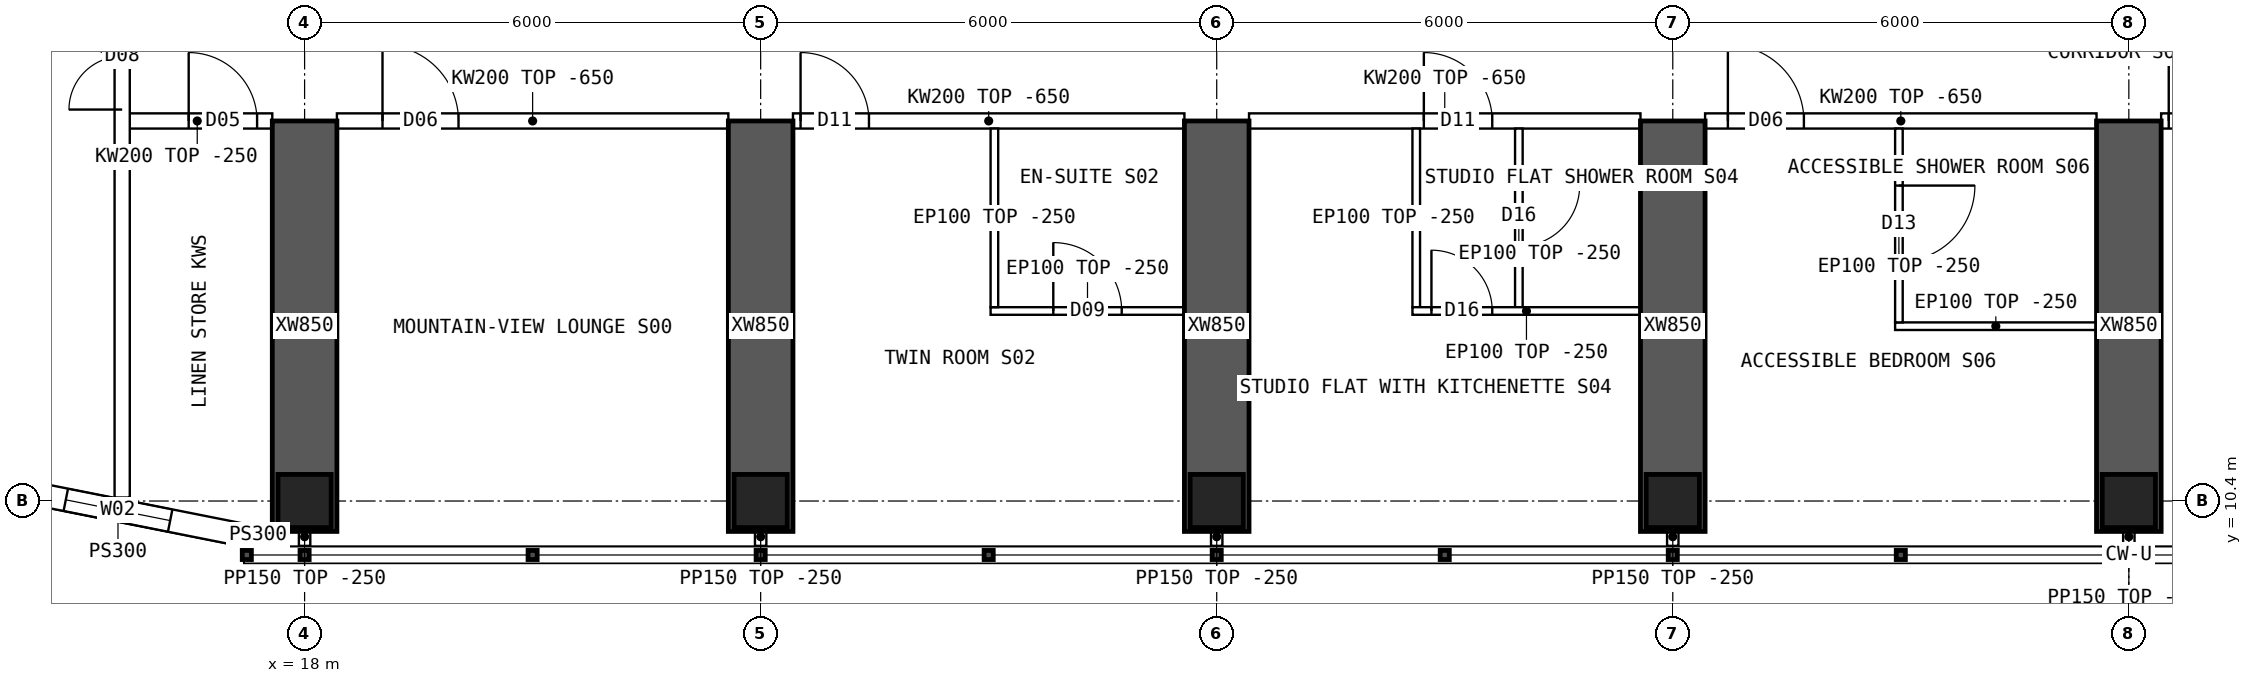
"""IFC4 building model, lengths in metres.
Left out: names, types, materials, properties, quantities, classifications, styles, units other than length and angle.
Written with IfcOpenShell. Run it as: python <this file> out.ifc"""

import sys

from ifc_helpers import new_model, si_unit, direction, frame, frame_2d, origin, origin_2d, place, context, subcontext, project, spatial, polyline, rectangle, hollow_rectangle, outline, extrude, element, fill, save


model = new_model("IFC4")
c1 = context("Model", 3, precision=1e-05, world=origin(), true_north=direction((0.0, 1.0)))
c2 = subcontext(c1, "Body", "Model", "MODEL_VIEW")
j1 = project(units=[si_unit("LENGTHUNIT", "METRE"), si_unit("PLANEANGLEUNIT", "RADIAN")], contexts=[c1])
p1 = place(None, origin())
s1 = spatial("IfcSite", under=j1, at=p1, CompositionType="ELEMENT")
p2 = place(p1, origin())
s2 = spatial("IfcBuilding", under=s1, at=p2, CompositionType="ELEMENT")
p3 = place(p2, frame((0.0, 0.0, 148.6)))
s3 = spatial("IfcBuildingStorey", under=s2, at=p3, CompositionType="ELEMENT", Elevation=148.6)
for number, where, z_axis, x_axis in (
    (1, (18.0, 10.4, 0.0), (0.0, 0.0, 1.0), (1.0, 0.0, 0.0)),
    (2, (24.0, 10.4, 0.0), (0.0, 0.0, 1.0), (1.0, 0.0, 0.0)),
    (3, (30.0, 10.4, 0.0), (0.0, 0.0, 1.0), (1.0, 0.0, 0.0)),
    (4, (36.0, 10.4, 0.0), (0.0, 0.0, 1.0), (1.0, 0.0, 0.0)),
    (5, (42.0, 10.4, 0.0), (0.0, 0.0, 1.0), (1.0, 0.0, 0.0)),
):
    element("IfcColumn", number, at=place(p3, frame(where, z_axis=z_axis, x_axis=x_axis)), inside=s3, PredefinedType="COLUMN", context=c2, shape_type="SweptSolid", body=[
        extrude(hollow_rectangle(XDim=0.7, YDim=0.7, WallThickness=0.07, at=origin_2d()), origin(), (0.0, 0.0, 1.0), 3.75),
    ])
for number, where, z_axis, x_axis in (
    (6, (18.0, 10.0, 0.0), (0.0, 0.0, 1.0), (0.0, 1.0, 0.0)),
    (7, (24.0, 10.0, 0.0), (0.0, 0.0, 1.0), (0.0, 1.0, 0.0)),
    (8, (30.0, 10.0, 0.0), (0.0, 0.0, 1.0), (0.0, 1.0, 0.0)),
    (9, (36.0, 10.0, 0.0), (0.0, 0.0, 1.0), (0.0, 1.0, 0.0)),
    (10, (42.0, 10.0, 0.0), (0.0, 0.0, 1.0), (0.0, 1.0, 0.0)),
):
    element("IfcWall", number, at=place(p3, frame(where, z_axis=z_axis, x_axis=x_axis)), inside=s3, PredefinedType="SHEAR", context=c2, shape_type="SweptSolid", body=[
        extrude(rectangle(XDim=5.4, YDim=0.85, at=frame_2d((2.7, 0.0))), origin(), (0.0, 0.0, 1.0), 3.75),
    ])
p4 = place(p3, frame((13.89, 10.608, 0.0), z_axis=(0.0, 0.0, 1.0), x_axis=(0.98078325777, -0.195100490205, 0.0)))
e11 = element("IfcWall", 11, at=p4, inside=s3, PredefinedType="SOLIDWALL", context=c2, shape_type="SweptSolid", body=[
    extrude(outline(polyline([(-0.03, -0.15), (3.405, -0.15), (3.345, 0.15), (0.03, 0.15), (-0.03, -0.15)])), origin(), (0.0, 0.0, 1.0), 3.5),
])
p5 = place(p4, frame((0.988, 0.0, 0.9)))
e12 = element("IfcOpeningElement", 12, at=p5, cuts=e11, PredefinedType="OPENING", context=c2, shape_type="SweptSolid", body=[
    extrude(rectangle(XDim=1.4, YDim=1.8, at=frame_2d((0.7, 0.9))), frame((0.0, 0.16, 0.0), z_axis=(0.0, -1.0, 0.0), x_axis=(1.0, 0.0, 0.0)), (0.0, 0.0, 1.0), 0.32),
])
p6 = place(p3, frame((17.2, 9.95, 0.0), z_axis=(0.0, 0.0, 1.0), x_axis=(1.0, 0.0, 0.0)))
e13 = element("IfcWall", 13, at=p6, inside=s3, PredefinedType="SOLIDWALL", context=c2, shape_type="SweptSolid", body=[
    extrude(rectangle(XDim=0.375, YDim=0.3, at=frame_2d((0.188, 0.0))), origin(), (0.0, 0.0, 1.0), 3.5),
])
p7 = place(p3, frame((15.6, 15.4, 0.0), z_axis=(0.0, 0.0, 1.0), x_axis=(1.0, 0.0, 0.0)))
e14 = element("IfcWall", 14, at=p7, inside=s3, PredefinedType="SOLIDWALL", context=c2, shape_type="SweptSolid", body=[
    extrude(rectangle(XDim=1.975, YDim=0.2, at=frame_2d((0.987, 0.0))), origin(), (0.0, 0.0, 1.0), 3.5),
])
p8 = place(p7, frame((0.875, 0.0, 0.0)))
e15 = element("IfcOpeningElement", 15, at=p8, cuts=e14, PredefinedType="OPENING", context=c2, shape_type="SweptSolid", body=[
    extrude(rectangle(XDim=0.9, YDim=2.1, at=frame_2d((0.45, 1.05))), frame((0.0, 0.11, 0.0), z_axis=(0.0, -1.0, 0.0), x_axis=(1.0, 0.0, 0.0)), (0.0, 0.0, 1.0), 0.22),
])
p9 = place(p3, frame((18.425, 15.4, 0.0), z_axis=(0.0, 0.0, 1.0), x_axis=(1.0, 0.0, 0.0)))
e16 = element("IfcWall", 16, at=p9, inside=s3, PredefinedType="SOLIDWALL", context=c2, shape_type="SweptSolid", body=[
    extrude(outline(polyline([(0.0, 0.0), (5.15, 0.0), (5.15, 3.1), (0.0, 3.1), (0.0, 0.0)])), frame((0.0, 0.1, 0.0), z_axis=(0.0, -1.0, 0.0), x_axis=(1.0, 0.0, 0.0)), (0.0, 0.0, 1.0), 0.2),
])
p10 = place(p9, frame((0.6, 0.0, 0.0)))
e17 = element("IfcOpeningElement", 17, at=p10, cuts=e16, PredefinedType="OPENING", context=c2, shape_type="SweptSolid", body=[
    extrude(rectangle(XDim=1.0, YDim=2.1, at=frame_2d((0.5, 1.05))), frame((0.0, 0.11, 0.0), z_axis=(0.0, -1.0, 0.0), x_axis=(1.0, 0.0, 0.0)), (0.0, 0.0, 1.0), 0.22),
])
p11 = place(p3, frame((24.425, 15.4, 0.0), z_axis=(0.0, 0.0, 1.0), x_axis=(1.0, 0.0, 0.0)))
e18 = element("IfcWall", 18, at=p11, inside=s3, PredefinedType="SOLIDWALL", context=c2, shape_type="SweptSolid", body=[
    extrude(outline(polyline([(0.0, 0.0), (5.15, 0.0), (5.15, 3.1), (0.0, 3.1), (0.0, 0.0)])), frame((0.0, 0.1, 0.0), z_axis=(0.0, -1.0, 0.0), x_axis=(1.0, 0.0, 0.0)), (0.0, 0.0, 1.0), 0.2),
])
p12 = place(p11, frame((0.1, 0.0, 0.0)))
e19 = element("IfcOpeningElement", 19, at=p12, cuts=e18, PredefinedType="OPENING", context=c2, shape_type="SweptSolid", body=[
    extrude(rectangle(XDim=0.9, YDim=2.1, at=frame_2d((0.45, 1.05))), frame((0.0, 0.11, 0.0), z_axis=(0.0, -1.0, 0.0), x_axis=(1.0, 0.0, 0.0)), (0.0, 0.0, 1.0), 0.22),
])
p13 = place(p3, frame((30.425, 15.4, 0.0), z_axis=(0.0, 0.0, 1.0), x_axis=(1.0, 0.0, 0.0)))
e20 = element("IfcWall", 20, at=p13, inside=s3, PredefinedType="SOLIDWALL", context=c2, shape_type="SweptSolid", body=[
    extrude(outline(polyline([(0.0, 0.0), (5.15, 0.0), (5.15, 3.1), (0.0, 3.1), (0.0, 0.0)])), frame((0.0, 0.1, 0.0), z_axis=(0.0, -1.0, 0.0), x_axis=(1.0, 0.0, 0.0)), (0.0, 0.0, 1.0), 0.2),
])
p14 = place(p13, frame((2.3, 0.0, 0.0)))
e21 = element("IfcOpeningElement", 21, at=p14, cuts=e20, PredefinedType="OPENING", context=c2, shape_type="SweptSolid", body=[
    extrude(rectangle(XDim=0.9, YDim=2.1, at=frame_2d((0.45, 1.05))), frame((0.0, 0.11, 0.0), z_axis=(0.0, -1.0, 0.0), x_axis=(1.0, 0.0, 0.0)), (0.0, 0.0, 1.0), 0.22),
])
p15 = place(p3, frame((36.425, 15.4, 0.0), z_axis=(0.0, 0.0, 1.0), x_axis=(1.0, 0.0, 0.0)))
e22 = element("IfcWall", 22, at=p15, inside=s3, PredefinedType="SOLIDWALL", context=c2, shape_type="SweptSolid", body=[
    extrude(outline(polyline([(0.0, 0.0), (5.15, 0.0), (5.15, 3.1), (0.0, 3.1), (0.0, 0.0)])), frame((0.0, 0.1, 0.0), z_axis=(0.0, -1.0, 0.0), x_axis=(1.0, 0.0, 0.0)), (0.0, 0.0, 1.0), 0.2),
])
p16 = place(p15, frame((0.3, 0.0, 0.0)))
e23 = element("IfcOpeningElement", 23, at=p16, cuts=e22, PredefinedType="OPENING", context=c2, shape_type="SweptSolid", body=[
    extrude(rectangle(XDim=1.0, YDim=2.1, at=frame_2d((0.5, 1.05))), frame((0.0, 0.11, 0.0), z_axis=(0.0, -1.0, 0.0), x_axis=(1.0, 0.0, 0.0)), (0.0, 0.0, 1.0), 0.22),
])
p17 = place(p3, frame((42.425, 15.4, 0.0), z_axis=(0.0, 0.0, 1.0), x_axis=(1.0, 0.0, 0.0)))
e24 = element("IfcWall", 24, at=p17, inside=s3, PredefinedType="SOLIDWALL", context=c2, shape_type="SweptSolid", body=[
    extrude(outline(polyline([(0.0, 0.0), (5.15, 0.0), (5.15, 3.1), (0.0, 3.1), (0.0, 0.0)])), frame((0.0, 0.1, 0.0), z_axis=(0.0, -1.0, 0.0), x_axis=(1.0, 0.0, 0.0)), (0.0, 0.0, 1.0), 0.2),
])
p18 = place(p17, frame((0.1, 0.0, 0.0)))
e25 = element("IfcOpeningElement", 25, at=p18, cuts=e24, PredefinedType="OPENING", context=c2, shape_type="SweptSolid", body=[
    extrude(rectangle(XDim=0.9, YDim=2.1, at=frame_2d((0.45, 1.05))), frame((0.0, 0.11, 0.0), z_axis=(0.0, -1.0, 0.0), x_axis=(1.0, 0.0, 0.0)), (0.0, 0.0, 1.0), 0.22),
])
p19 = place(p3, frame((29.575, 12.9, 0.0), z_axis=(0.0, 0.0, 1.0), x_axis=(-1.0, 0.0, 0.0)))
e26 = element("IfcWall", 26, at=p19, inside=s3, PredefinedType="PARTITIONING", context=c2, shape_type="SweptSolid", body=[
    extrude(rectangle(XDim=2.55, YDim=0.1, at=frame_2d((1.275, 0.0))), origin(), (0.0, 0.0, 1.0), 3.5),
])
p20 = place(p19, frame((0.825, 0.0, 0.0)))
e27 = element("IfcOpeningElement", 27, at=p20, cuts=e26, PredefinedType="OPENING", context=c2, shape_type="SweptSolid", body=[
    extrude(rectangle(XDim=0.9, YDim=2.1, at=frame_2d((0.45, 1.05))), frame((0.0, 0.06, 0.0), z_axis=(0.0, -1.0, 0.0), x_axis=(1.0, 0.0, 0.0)), (0.0, 0.0, 1.0), 0.12),
])
p21 = place(p3, frame((27.075, 12.95, 0.0), z_axis=(0.0, 0.0, 1.0), x_axis=(0.0, 1.0, 0.0)))
e28 = element("IfcWall", 28, at=p21, inside=s3, PredefinedType="PARTITIONING", context=c2, shape_type="SweptSolid", body=[
    extrude(outline(polyline([(0.0, 0.0), (2.35, 0.0), (2.35, 3.1), (2.302, 3.1), (2.3, 3.5), (0.0, 3.5), (0.0, 0.0)])), frame((0.0, 0.05, 0.0), z_axis=(0.0, -1.0, 0.0), x_axis=(1.0, 0.0, 0.0)), (0.0, 0.0, 1.0), 0.1),
])
p22 = place(p3, frame((35.575, 12.9, 0.0), z_axis=(0.0, 0.0, 1.0), x_axis=(-1.0, 0.0, 0.0)))
e29 = element("IfcWall", 29, at=p22, inside=s3, PredefinedType="PARTITIONING", context=c2, shape_type="SweptSolid", body=[
    extrude(rectangle(XDim=3.0, YDim=0.1, at=frame_2d((1.5, 0.0))), origin(), (0.0, 0.0, 1.0), 3.5),
])
p23 = place(p22, frame((1.95, 0.0, 0.0)))
e30 = element("IfcOpeningElement", 30, at=p23, cuts=e29, PredefinedType="OPENING", context=c2, shape_type="SweptSolid", body=[
    extrude(rectangle(XDim=0.8, YDim=2.1, at=frame_2d((0.4, 1.05))), frame((0.0, 0.06, 0.0), z_axis=(0.0, -1.0, 0.0), x_axis=(1.0, 0.0, 0.0)), (0.0, 0.0, 1.0), 0.12),
])
p24 = place(p3, frame((32.625, 12.95, 0.0), z_axis=(0.0, 0.0, 1.0), x_axis=(0.0, 1.0, 0.0)))
e31 = element("IfcWall", 31, at=p24, inside=s3, PredefinedType="PARTITIONING", context=c2, shape_type="SweptSolid", body=[
    extrude(outline(polyline([(0.0, 0.0), (2.35, 0.0), (2.35, 3.1), (2.302, 3.1), (2.3, 3.5), (0.0, 3.5), (0.0, 0.0)])), frame((0.0, 0.05, 0.0), z_axis=(0.0, -1.0, 0.0), x_axis=(1.0, 0.0, 0.0)), (0.0, 0.0, 1.0), 0.1),
])
p25 = place(p3, frame((33.975, 12.95, 0.0), z_axis=(0.0, 0.0, 1.0), x_axis=(0.0, 1.0, 0.0)))
e32 = element("IfcWall", 32, at=p25, inside=s3, PredefinedType="PARTITIONING", context=c2, shape_type="SweptSolid", body=[
    extrude(outline(polyline([(0.0, 0.0), (2.35, 0.0), (2.35, 3.1), (2.302, 3.1), (2.3, 3.5), (0.0, 3.5), (0.0, 0.0)])), frame((0.0, 0.05, 0.0), z_axis=(0.0, -1.0, 0.0), x_axis=(1.0, 0.0, 0.0)), (0.0, 0.0, 1.0), 0.1),
])
p26 = place(p25, frame((0.8, 0.0, 0.0)))
e33 = element("IfcOpeningElement", 33, at=p26, cuts=e32, PredefinedType="OPENING", context=c2, shape_type="SweptSolid", body=[
    extrude(rectangle(XDim=0.8, YDim=2.1, at=frame_2d((0.4, 1.05))), frame((0.0, 0.06, 0.0), z_axis=(0.0, -1.0, 0.0), x_axis=(1.0, 0.0, 0.0)), (0.0, 0.0, 1.0), 0.12),
])
p27 = place(p3, frame((38.925, 12.7, 0.0), z_axis=(0.0, 0.0, 1.0), x_axis=(1.0, 0.0, 0.0)))
e34 = element("IfcWall", 34, at=p27, inside=s3, PredefinedType="PARTITIONING", context=c2, shape_type="SweptSolid", body=[
    extrude(rectangle(XDim=2.65, YDim=0.1, at=frame_2d((1.325, 0.0))), origin(), (0.0, 0.0, 1.0), 3.5),
])
p28 = place(p3, frame((38.975, 12.75, 0.0), z_axis=(0.0, 0.0, 1.0), x_axis=(0.0, 1.0, 0.0)))
e35 = element("IfcWall", 35, at=p28, inside=s3, PredefinedType="PARTITIONING", context=c2, shape_type="SweptSolid", body=[
    extrude(outline(polyline([(0.0, 0.0), (2.55, 0.0), (2.55, 3.1), (2.502, 3.1), (2.5, 3.5), (0.0, 3.5), (0.0, 0.0)])), frame((0.0, 0.05, 0.0), z_axis=(0.0, -1.0, 0.0), x_axis=(1.0, 0.0, 0.0)), (0.0, 0.0, 1.0), 0.1),
])
p29 = place(p28, frame((0.8, 0.0, 0.0)))
e36 = element("IfcOpeningElement", 36, at=p29, cuts=e35, PredefinedType="OPENING", context=c2, shape_type="SweptSolid", body=[
    extrude(rectangle(XDim=1.0, YDim=2.1, at=frame_2d((0.5, 1.05))), frame((0.0, 0.06, 0.0), z_axis=(0.0, -1.0, 0.0), x_axis=(1.0, 0.0, 0.0)), (0.0, 0.0, 1.0), 0.12),
])
p30 = place(p3, frame((15.6, 10.446, 0.0), z_axis=(0.0, 0.0, 1.0), x_axis=(0.0, 1.0, 0.0)))
e37 = element("IfcWall", 37, at=p30, inside=s3, PredefinedType="SOLIDWALL", context=c2, shape_type="SweptSolid", body=[
    extrude(rectangle(XDim=43.107, YDim=0.2, at=frame_2d((21.554, 0.0))), origin(), (0.0, 0.0, 1.0), 3.5),
])
p31 = place(p30, frame((5.104, 0.0, 0.0)))
e38 = element("IfcOpeningElement", 38, at=p31, cuts=e37, PredefinedType="OPENING", context=c2, shape_type="SweptSolid", body=[
    extrude(rectangle(XDim=1.4, YDim=2.1, at=frame_2d((0.7, 1.05))), frame((0.0, 0.11, 0.0), z_axis=(0.0, -1.0, 0.0), x_axis=(1.0, 0.0, 0.0)), (0.0, 0.0, 1.0), 0.22),
])
p32 = place(p30, frame((36.504, 0.0, 0.0)))
e39 = element("IfcOpeningElement", 39, at=p32, cuts=e37, PredefinedType="OPENING", context=c2, shape_type="SweptSolid", body=[
    extrude(rectangle(XDim=1.4, YDim=2.1, at=frame_2d((0.7, 1.05))), frame((0.0, 0.11, 0.0), z_axis=(0.0, -1.0, 0.0), x_axis=(1.0, 0.0, 0.0)), (0.0, 0.0, 1.0), 0.22),
])
for number, where, z_axis, x_axis in (
    (40, (18.0, 10.05, 0.0), (0.0, 0.0, 1.0), (0.0, -1.0, 0.0)),
    (41, (24.0, 10.05, 0.0), (0.0, 0.0, 1.0), (0.0, -1.0, 0.0)),
    (42, (30.0, 10.05, 0.0), (0.0, 0.0, 1.0), (0.0, -1.0, 0.0)),
    (43, (36.0, 10.05, 0.0), (0.0, 0.0, 1.0), (0.0, -1.0, 0.0)),
    (44, (42.0, 10.05, 0.0), (0.0, 0.0, 1.0), (0.0, -1.0, 0.0)),
):
    element("IfcWall", number, at=place(p3, frame(where, z_axis=z_axis, x_axis=x_axis)), inside=s3, PredefinedType="PARTITIONING", context=c2, shape_type="SweptSolid", body=[
        extrude(rectangle(XDim=0.24, YDim=0.15, at=frame_2d((0.12, 0.0))), origin(), (0.0, 0.0, 1.0), 3.5),
    ])
p33 = place(p5, origin())
e45 = element("IfcWindow", 45, at=p33, inside=s3, PartitioningType="SINGLE_PANEL", PredefinedType="WINDOW", context=c2, shape_type="SweptSolid", body=[
    extrude(rectangle(XDim=1.4, YDim=1.8, at=frame_2d((0.7, 0.9))), frame((0.0, 0.03, 0.0), z_axis=(0.0, -1.0, 0.0), x_axis=(1.0, 0.0, 0.0)), (0.0, 0.0, 1.0), 0.06),
])
fill(e12, e45)
p34 = place(p10, origin())
e46 = element("IfcDoor", 46, at=p34, inside=s3, OperationType="SINGLE_SWING_LEFT", PredefinedType="DOOR", context=c2, shape_type="SweptSolid", body=[
    extrude(rectangle(XDim=1.0, YDim=2.1, at=frame_2d((0.5, 1.05))), frame((0.0, 0.025, 0.0), z_axis=(0.0, -1.0, 0.0), x_axis=(1.0, 0.0, 0.0)), (0.0, 0.0, 1.0), 0.05),
])
fill(e17, e46)
p35 = place(p20, origin())
e47 = element("IfcDoor", 47, at=p35, inside=s3, OperationType="SINGLE_SWING_RIGHT", PredefinedType="DOOR", context=c2, shape_type="SweptSolid", body=[
    extrude(rectangle(XDim=0.9, YDim=2.1, at=frame_2d((0.45, 1.05))), frame((0.0, 0.025, 0.0), z_axis=(0.0, -1.0, 0.0), x_axis=(1.0, 0.0, 0.0)), (0.0, 0.0, 1.0), 0.05),
])
fill(e27, e47)
p36 = place(p12, origin())
e48 = element("IfcDoor", 48, at=p36, inside=s3, OperationType="SINGLE_SWING_LEFT", PredefinedType="DOOR", context=c2, shape_type="SweptSolid", body=[
    extrude(rectangle(XDim=0.9, YDim=2.1, at=frame_2d((0.45, 1.05))), frame((0.0, 0.025, 0.0), z_axis=(0.0, -1.0, 0.0), x_axis=(1.0, 0.0, 0.0)), (0.0, 0.0, 1.0), 0.05),
])
fill(e19, e48)
p37 = place(p23, origin())
e49 = element("IfcDoor", 49, at=p37, inside=s3, OperationType="SINGLE_SWING_RIGHT", PredefinedType="DOOR", context=c2, shape_type="SweptSolid", body=[
    extrude(rectangle(XDim=0.8, YDim=2.1, at=frame_2d((0.4, 1.05))), frame((0.0, 0.025, 0.0), z_axis=(0.0, -1.0, 0.0), x_axis=(1.0, 0.0, 0.0)), (0.0, 0.0, 1.0), 0.05),
])
fill(e30, e49)
p38 = place(p26, origin())
e50 = element("IfcDoor", 50, at=p38, inside=s3, OperationType="SINGLE_SWING_RIGHT", PredefinedType="DOOR", context=c2, shape_type="SweptSolid", body=[
    extrude(rectangle(XDim=0.8, YDim=2.1, at=frame_2d((0.4, 1.05))), frame((0.0, 0.025, 0.0), z_axis=(0.0, -1.0, 0.0), x_axis=(1.0, 0.0, 0.0)), (0.0, 0.0, 1.0), 0.05),
])
fill(e33, e50)
p39 = place(p14, origin())
e51 = element("IfcDoor", 51, at=p39, inside=s3, OperationType="SINGLE_SWING_LEFT", PredefinedType="DOOR", context=c2, shape_type="SweptSolid", body=[
    extrude(rectangle(XDim=0.9, YDim=2.1, at=frame_2d((0.45, 1.05))), frame((0.0, 0.025, 0.0), z_axis=(0.0, -1.0, 0.0), x_axis=(1.0, 0.0, 0.0)), (0.0, 0.0, 1.0), 0.05),
])
fill(e21, e51)
p40 = place(p29, origin())
e52 = element("IfcDoor", 52, at=p40, inside=s3, OperationType="SINGLE_SWING_RIGHT", PredefinedType="DOOR", context=c2, shape_type="SweptSolid", body=[
    extrude(rectangle(XDim=1.0, YDim=2.1, at=frame_2d((0.5, 1.05))), frame((0.0, 0.025, 0.0), z_axis=(0.0, -1.0, 0.0), x_axis=(1.0, 0.0, 0.0)), (0.0, 0.0, 1.0), 0.05),
])
fill(e36, e52)
p41 = place(p16, origin())
e53 = element("IfcDoor", 53, at=p41, inside=s3, OperationType="SINGLE_SWING_LEFT", PredefinedType="DOOR", context=c2, shape_type="SweptSolid", body=[
    extrude(rectangle(XDim=1.0, YDim=2.1, at=frame_2d((0.5, 1.05))), frame((0.0, 0.025, 0.0), z_axis=(0.0, -1.0, 0.0), x_axis=(1.0, 0.0, 0.0)), (0.0, 0.0, 1.0), 0.05),
])
fill(e23, e53)
p42 = place(p18, origin())
e54 = element("IfcDoor", 54, at=p42, inside=s3, OperationType="SINGLE_SWING_LEFT", PredefinedType="DOOR", context=c2, shape_type="SweptSolid", body=[
    extrude(rectangle(XDim=0.9, YDim=2.1, at=frame_2d((0.45, 1.05))), frame((0.0, 0.025, 0.0), z_axis=(0.0, -1.0, 0.0), x_axis=(1.0, 0.0, 0.0)), (0.0, 0.0, 1.0), 0.05),
])
fill(e25, e54)
p43 = place(p31, origin())
e55 = element("IfcDoor", 55, at=p43, inside=s3, OperationType="DOUBLE_DOOR_SINGLE_SWING", PredefinedType="DOOR", context=c2, shape_type="SweptSolid", body=[
    extrude(rectangle(XDim=1.4, YDim=2.1, at=frame_2d((0.7, 1.05))), frame((0.0, 0.025, 0.0), z_axis=(0.0, -1.0, 0.0), x_axis=(1.0, 0.0, 0.0)), (0.0, 0.0, 1.0), 0.05),
])
fill(e38, e55)
p44 = place(p8, origin())
e56 = element("IfcDoor", 56, at=p44, inside=s3, OperationType="SINGLE_SWING_LEFT", PredefinedType="DOOR", context=c2, shape_type="SweptSolid", body=[
    extrude(rectangle(XDim=0.9, YDim=2.1, at=frame_2d((0.45, 1.05))), frame((0.0, 0.025, 0.0), z_axis=(0.0, -1.0, 0.0), x_axis=(1.0, 0.0, 0.0)), (0.0, 0.0, 1.0), 0.05),
])
fill(e15, e56)
save(model, sys.argv[1])
